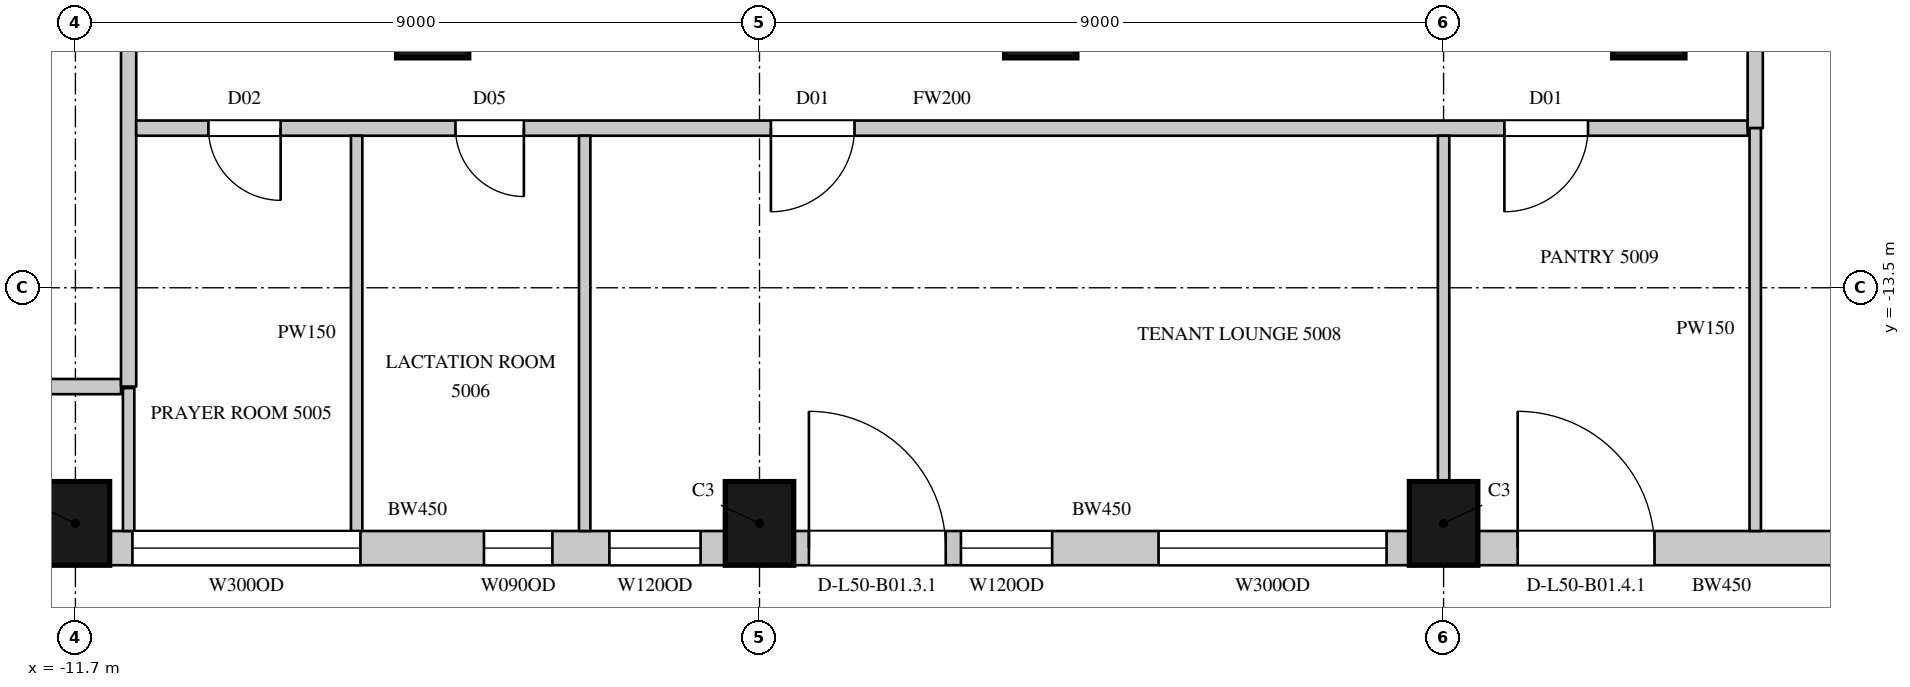
"""IFC4 building model, lengths in metres.
Left out: names, types, materials, properties, quantities, classifications, styles, units other than length and angle.
Written with IfcOpenShell. Run it as: python <this file> out.ifc"""

import sys

from ifc_helpers import new_model, si_unit, direction, frame, frame_2d, origin, origin_2d, place, context, subcontext, project, spatial, rectangle, circle, extrude, element, fill, save


model = new_model("IFC4")
c1 = context("Model", 3, precision=1e-05, world=origin(), true_north=direction((0.0, 1.0)))
c2 = subcontext(c1, "Body", "Model", "MODEL_VIEW")
j1 = project(units=[si_unit("LENGTHUNIT", "METRE"), si_unit("PLANEANGLEUNIT", "RADIAN")], contexts=[c1])
p1 = place(None, origin())
s1 = spatial("IfcSite", under=j1, at=p1, CompositionType="ELEMENT")
p2 = place(p1, origin())
s2 = spatial("IfcBuilding", under=s1, at=p2, CompositionType="ELEMENT")
p3 = place(p2, frame((0.0, 0.0, 226.1)))
s3 = spatial("IfcBuildingStorey", under=s2, at=p3, CompositionType="ELEMENT", Elevation=226.1)
for number, where, z_axis, x_axis in (
    (1, (-11.7, -16.6, 0.0), (0.0, 0.0, 1.0), (1.0, 0.0, 0.0)),
    (2, (-2.7, -16.6, 0.0), (0.0, 0.0, 1.0), (1.0, 0.0, 0.0)),
    (3, (6.3, -16.6, 0.0), (0.0, 0.0, 1.0), (1.0, 0.0, 0.0)),
):
    element("IfcColumn", number, at=place(p3, frame(where, z_axis=z_axis, x_axis=x_axis)), inside=s3, PredefinedType="COLUMN", context=c2, shape_type="SweptSolid", body=[
        extrude(rectangle(XDim=0.9, YDim=1.1, at=origin_2d()), origin(), (0.0, 0.0, 1.0), 4.1),
    ])
for number, where, z_axis, x_axis in (
    (4, (-7.0, -10.0, 0.0), (0.0, 0.0, 1.0), (1.0, 0.0, 0.0)),
    (5, (1.0, -10.0, 0.0), (0.0, 0.0, 1.0), (1.0, 0.0, 0.0)),
    (6, (9.0, -10.0, 0.0), (0.0, 0.0, 1.0), (1.0, 0.0, 0.0)),
):
    element("IfcColumn", number, at=place(p3, frame(where, z_axis=z_axis, x_axis=x_axis)), inside=s3, PredefinedType="COLUMN", context=c2, shape_type="SweptSolid", body=[
        extrude(circle(Radius=0.475, at=origin_2d()), origin(), (0.0, 0.0, 1.0), 4.1),
    ])
p4 = place(p3, frame((-11.25, -16.925, 0.0), z_axis=(0.0, 0.0, 1.0), x_axis=(1.0, 0.0, 0.0)))
e7 = element("IfcWall", 7, at=p4, inside=s3, PredefinedType="SOLIDWALL", context=c2, shape_type="SweptSolid", body=[
    extrude(rectangle(XDim=8.1, YDim=0.45, at=frame_2d((4.05, 0.0))), origin(), (0.0, 0.0, 1.0), 3.8),
])
p5 = place(p4, frame((0.3, 0.0, 1.05)))
e8 = element("IfcOpeningElement", 8, at=p5, cuts=e7, PredefinedType="OPENING", context=c2, shape_type="SweptSolid", body=[
    extrude(rectangle(XDim=3.0, YDim=2.4, at=frame_2d((1.5, 1.2))), frame((0.0, 0.235, 0.0), z_axis=(0.0, -1.0, 0.0), x_axis=(1.0, 0.0, 0.0)), (0.0, 0.0, 1.0), 0.47),
])
p6 = place(p4, frame((4.925, 0.0, 1.05)))
e9 = element("IfcOpeningElement", 9, at=p6, cuts=e7, PredefinedType="OPENING", context=c2, shape_type="SweptSolid", body=[
    extrude(rectangle(XDim=0.9, YDim=2.4, at=frame_2d((0.45, 1.2))), frame((0.0, 0.235, 0.0), z_axis=(0.0, -1.0, 0.0), x_axis=(1.0, 0.0, 0.0)), (0.0, 0.0, 1.0), 0.47),
])
p7 = place(p4, frame((6.575, 0.0, 1.05)))
e10 = element("IfcOpeningElement", 10, at=p7, cuts=e7, PredefinedType="OPENING", context=c2, shape_type="SweptSolid", body=[
    extrude(rectangle(XDim=1.2, YDim=2.4, at=frame_2d((0.6, 1.2))), frame((0.0, 0.235, 0.0), z_axis=(0.0, -1.0, 0.0), x_axis=(1.0, 0.0, 0.0)), (0.0, 0.0, 1.0), 0.47),
])
p8 = place(p3, frame((-2.25, -16.925, 0.0), z_axis=(0.0, 0.0, 1.0), x_axis=(1.0, 0.0, 0.0)))
e11 = element("IfcWall", 11, at=p8, inside=s3, PredefinedType="SOLIDWALL", context=c2, shape_type="SweptSolid", body=[
    extrude(rectangle(XDim=8.1, YDim=0.45, at=frame_2d((4.05, 0.0))), origin(), (0.0, 0.0, 1.0), 3.8),
])
p9 = place(p8, frame((0.2, 0.0, 0.0)))
e12 = element("IfcOpeningElement", 12, at=p9, cuts=e11, PredefinedType="OPENING", context=c2, shape_type="SweptSolid", body=[
    extrude(rectangle(XDim=1.8, YDim=2.4, at=frame_2d((0.9, 1.2))), frame((0.0, 0.235, 0.0), z_axis=(0.0, -1.0, 0.0), x_axis=(1.0, 0.0, 0.0)), (0.0, 0.0, 1.0), 0.47),
])
p10 = place(p8, frame((2.2, 0.0, 1.05)))
e13 = element("IfcOpeningElement", 13, at=p10, cuts=e11, PredefinedType="OPENING", context=c2, shape_type="SweptSolid", body=[
    extrude(rectangle(XDim=1.2, YDim=2.4, at=frame_2d((0.6, 1.2))), frame((0.0, 0.235, 0.0), z_axis=(0.0, -1.0, 0.0), x_axis=(1.0, 0.0, 0.0)), (0.0, 0.0, 1.0), 0.47),
])
p11 = place(p8, frame((4.8, 0.0, 1.05)))
e14 = element("IfcOpeningElement", 14, at=p11, cuts=e11, PredefinedType="OPENING", context=c2, shape_type="SweptSolid", body=[
    extrude(rectangle(XDim=3.0, YDim=2.4, at=frame_2d((1.5, 1.2))), frame((0.0, 0.235, 0.0), z_axis=(0.0, -1.0, 0.0), x_axis=(1.0, 0.0, 0.0)), (0.0, 0.0, 1.0), 0.47),
])
p12 = place(p3, frame((6.75, -16.925, 0.0), z_axis=(0.0, 0.0, 1.0), x_axis=(1.0, 0.0, 0.0)))
e15 = element("IfcWall", 15, at=p12, inside=s3, PredefinedType="SOLIDWALL", context=c2, shape_type="SweptSolid", body=[
    extrude(rectangle(XDim=6.414, YDim=0.45, at=frame_2d((3.207, 0.0))), origin(), (0.0, 0.0, 1.0), 3.8),
])
p13 = place(p12, frame((0.525, 0.0, 0.0)))
e16 = element("IfcOpeningElement", 16, at=p13, cuts=e15, PredefinedType="OPENING", context=c2, shape_type="SweptSolid", body=[
    extrude(rectangle(XDim=1.8, YDim=2.4, at=frame_2d((0.9, 1.2))), frame((0.0, 0.235, 0.0), z_axis=(0.0, -1.0, 0.0), x_axis=(1.0, 0.0, 0.0)), (0.0, 0.0, 1.0), 0.47),
])
p14 = place(p3, frame((-13.97, -14.8, 0.0), z_axis=(0.0, 0.0, 1.0), x_axis=(1.0, 0.0, 0.0)))
e17 = element("IfcWall", 17, at=p14, inside=s3, PredefinedType="PARTITIONING", context=c2, shape_type="SweptSolid", body=[
    extrude(rectangle(XDim=2.87, YDim=0.2, at=frame_2d((1.435, 0.0))), origin(), (0.0, 0.0, 1.0), 3.8),
])
p15 = place(p3, frame((-11.0, -14.8, 0.0), z_axis=(0.0, 0.0, 1.0), x_axis=(0.0, 1.0, 0.0)))
e18 = element("IfcWall", 18, at=p15, inside=s3, PredefinedType="PARTITIONING", context=c2, shape_type="SweptSolid", body=[
    extrude(rectangle(XDim=29.6, YDim=0.2, at=frame_2d((14.8, 0.0))), origin(), (0.0, 0.0, 1.0), 3.8),
])
p16 = place(p15, frame((14.45, 0.0, 0.0)))
e19 = element("IfcOpeningElement", 19, at=p16, cuts=e18, PredefinedType="OPENING", context=c2, shape_type="SweptSolid", body=[
    extrude(rectangle(XDim=1.5, YDim=2.4, at=frame_2d((0.75, 1.2))), frame((0.0, 0.11, 0.0), z_axis=(0.0, -1.0, 0.0), x_axis=(1.0, 0.0, 0.0)), (0.0, 0.0, 1.0), 0.22),
])
p17 = place(p3, frame((-10.9, -11.4, 0.0), z_axis=(0.0, 0.0, 1.0), x_axis=(1.0, 0.0, 0.0)))
e20 = element("IfcWall", 20, at=p17, inside=s3, PredefinedType="PARTITIONING", context=c2, shape_type="SweptSolid", body=[
    extrude(rectangle(XDim=21.2, YDim=0.2, at=frame_2d((10.6, 0.0))), origin(), (0.0, 0.0, 1.0), 3.8),
])
p18 = place(p17, frame((0.95, 0.0, 0.0)))
e21 = element("IfcOpeningElement", 21, at=p18, cuts=e20, PredefinedType="OPENING", context=c2, shape_type="SweptSolid", body=[
    extrude(rectangle(XDim=0.95, YDim=2.2, at=frame_2d((0.475, 1.1))), frame((0.0, 0.11, 0.0), z_axis=(0.0, -1.0, 0.0), x_axis=(1.0, 0.0, 0.0)), (0.0, 0.0, 1.0), 0.22),
])
p19 = place(p17, frame((4.2, 0.0, 0.0)))
e22 = element("IfcOpeningElement", 22, at=p19, cuts=e20, PredefinedType="OPENING", context=c2, shape_type="SweptSolid", body=[
    extrude(rectangle(XDim=0.9, YDim=2.2, at=frame_2d((0.45, 1.1))), frame((0.0, 0.11, 0.0), z_axis=(0.0, -1.0, 0.0), x_axis=(1.0, 0.0, 0.0)), (0.0, 0.0, 1.0), 0.22),
])
p20 = place(p17, frame((8.35, 0.0, 0.0)))
e23 = element("IfcOpeningElement", 23, at=p20, cuts=e20, PredefinedType="OPENING", context=c2, shape_type="SweptSolid", body=[
    extrude(rectangle(XDim=1.1, YDim=2.4, at=frame_2d((0.55, 1.2))), frame((0.0, 0.11, 0.0), z_axis=(0.0, -1.0, 0.0), x_axis=(1.0, 0.0, 0.0)), (0.0, 0.0, 1.0), 0.22),
])
p21 = place(p17, frame((18.0, 0.0, 0.0)))
e24 = element("IfcOpeningElement", 24, at=p21, cuts=e20, PredefinedType="OPENING", context=c2, shape_type="SweptSolid", body=[
    extrude(rectangle(XDim=1.1, YDim=2.4, at=frame_2d((0.55, 1.2))), frame((0.0, 0.11, 0.0), z_axis=(0.0, -1.0, 0.0), x_axis=(1.0, 0.0, 0.0)), (0.0, 0.0, 1.0), 0.22),
])
p22 = place(p3, frame((10.4, -11.4, 0.0), z_axis=(0.0, 0.0, 1.0), x_axis=(0.0, 1.0, 0.0)))
e25 = element("IfcWall", 25, at=p22, inside=s3, PredefinedType="PARTITIONING", context=c2, shape_type="SweptSolid", body=[
    extrude(rectangle(XDim=23.5, YDim=0.2, at=frame_2d((11.75, 0.0))), origin(), (0.0, 0.0, 1.0), 3.8),
])
p23 = place(p22, frame((9.25, 0.0, 0.0)))
e26 = element("IfcOpeningElement", 26, at=p23, cuts=e25, PredefinedType="OPENING", context=c2, shape_type="SweptSolid", body=[
    extrude(rectangle(XDim=1.5, YDim=2.4, at=frame_2d((0.75, 1.2))), frame((0.0, 0.11, 0.0), z_axis=(0.0, -1.0, 0.0), x_axis=(1.0, 0.0, 0.0)), (0.0, 0.0, 1.0), 0.22),
])
p24 = place(p22, frame((2.85, 0.0, 0.0)))
e27 = element("IfcOpeningElement", 27, at=p24, cuts=e25, PredefinedType="OPENING", context=c2, shape_type="SweptSolid", body=[
    extrude(rectangle(XDim=1.1, YDim=2.4, at=frame_2d((0.55, 1.2))), frame((0.0, 0.11, 0.0), z_axis=(0.0, -1.0, 0.0), x_axis=(1.0, 0.0, 0.0)), (0.0, 0.0, 1.0), 0.22),
])
p25 = place(p3, frame((-11.0, -16.7, 0.0), z_axis=(0.0, 0.0, 1.0), x_axis=(0.0, 1.0, 0.0)))
e28 = element("IfcWall", 28, at=p25, inside=s3, PredefinedType="PARTITIONING", context=c2, shape_type="SweptSolid", body=[
    extrude(rectangle(XDim=1.88, YDim=0.15, at=frame_2d((0.94, 0.0))), origin(), (0.0, 0.0, 1.0), 3.8),
])
for number, where, z_axis, x_axis in (
    (29, (-8.0, -16.7, 0.0), (0.0, 0.0, 1.0), (0.0, 1.0, 0.0)),
    (30, (-5.0, -16.7, 0.0), (0.0, 0.0, 1.0), (0.0, 1.0, 0.0)),
):
    element("IfcWall", number, at=place(p3, frame(where, z_axis=z_axis, x_axis=x_axis)), inside=s3, PredefinedType="PARTITIONING", context=c2, shape_type="SweptSolid", body=[
        extrude(rectangle(XDim=5.2, YDim=0.15, at=frame_2d((2.6, 0.0))), origin(), (0.0, 0.0, 1.0), 3.8),
    ])
p26 = place(p3, frame((6.3, -16.05, 0.0), z_axis=(0.0, 0.0, 1.0), x_axis=(0.0, 1.0, 0.0)))
e31 = element("IfcWall", 31, at=p26, inside=s3, PredefinedType="PARTITIONING", context=c2, shape_type="SweptSolid", body=[
    extrude(rectangle(XDim=4.55, YDim=0.15, at=frame_2d((2.275, 0.0))), origin(), (0.0, 0.0, 1.0), 3.25),
])
p27 = place(p3, frame((10.4, -16.7, 0.0), z_axis=(0.0, 0.0, 1.0), x_axis=(0.0, 1.0, 0.0)))
e32 = element("IfcWall", 32, at=p27, inside=s3, PredefinedType="PARTITIONING", context=c2, shape_type="SweptSolid", body=[
    extrude(rectangle(XDim=5.3, YDim=0.15, at=frame_2d((2.65, 0.0))), origin(), (0.0, 0.0, 1.0), 3.8),
])
p28 = place(p5, origin())
e33 = element("IfcWindow", 33, at=p28, inside=s3, PartitioningType="SINGLE_PANEL", PredefinedType="WINDOW", context=c2, shape_type="SweptSolid", body=[
    extrude(rectangle(XDim=3.0, YDim=2.4, at=frame_2d((1.5, 1.2))), frame((0.0, 0.135, 0.0), z_axis=(0.0, -1.0, 0.0), x_axis=(1.0, 0.0, 0.0)), (0.0, 0.0, 1.0), 0.06),
])
fill(e8, e33)
p29 = place(p9, origin())
e34 = element("IfcDoor", 34, at=p29, inside=s3, OperationType="SLIDING_TO_LEFT", PredefinedType="DOOR", context=c2, shape_type="SweptSolid", body=[
    extrude(rectangle(XDim=1.8, YDim=2.4, at=frame_2d((0.9, 1.2))), frame((0.0, 0.13, 0.0), z_axis=(0.0, -1.0, 0.0), x_axis=(1.0, 0.0, 0.0)), (0.0, 0.0, 1.0), 0.05),
])
fill(e12, e34)
p30 = place(p10, origin())
e35 = element("IfcWindow", 35, at=p30, inside=s3, PartitioningType="SINGLE_PANEL", PredefinedType="WINDOW", context=c2, shape_type="SweptSolid", body=[
    extrude(rectangle(XDim=1.2, YDim=2.4, at=frame_2d((0.6, 1.2))), frame((0.0, 0.135, 0.0), z_axis=(0.0, -1.0, 0.0), x_axis=(1.0, 0.0, 0.0)), (0.0, 0.0, 1.0), 0.06),
])
fill(e13, e35)
p31 = place(p11, origin())
e36 = element("IfcWindow", 36, at=p31, inside=s3, PartitioningType="SINGLE_PANEL", PredefinedType="WINDOW", context=c2, shape_type="SweptSolid", body=[
    extrude(rectangle(XDim=3.0, YDim=2.4, at=frame_2d((1.5, 1.2))), frame((0.0, 0.135, 0.0), z_axis=(0.0, -1.0, 0.0), x_axis=(1.0, 0.0, 0.0)), (0.0, 0.0, 1.0), 0.06),
])
fill(e14, e36)
p32 = place(p13, origin())
e37 = element("IfcDoor", 37, at=p32, inside=s3, OperationType="SLIDING_TO_LEFT", PredefinedType="DOOR", context=c2, shape_type="SweptSolid", body=[
    extrude(rectangle(XDim=1.8, YDim=2.4, at=frame_2d((0.9, 1.2))), frame((0.0, 0.13, 0.0), z_axis=(0.0, -1.0, 0.0), x_axis=(1.0, 0.0, 0.0)), (0.0, 0.0, 1.0), 0.05),
])
fill(e16, e37)
p33 = place(p18, origin())
e38 = element("IfcDoor", 38, at=p33, inside=s3, OperationType="SINGLE_SWING_LEFT", PredefinedType="DOOR", context=c2, shape_type="SweptSolid", body=[
    extrude(rectangle(XDim=0.95, YDim=2.2, at=frame_2d((0.475, 1.1))), frame((0.0, 0.025, 0.0), z_axis=(0.0, -1.0, 0.0), x_axis=(1.0, 0.0, 0.0)), (0.0, 0.0, 1.0), 0.05),
])
fill(e21, e38)
p34 = place(p19, origin())
e39 = element("IfcDoor", 39, at=p34, inside=s3, OperationType="SINGLE_SWING_LEFT", PredefinedType="DOOR", context=c2, shape_type="SweptSolid", body=[
    extrude(rectangle(XDim=0.9, YDim=2.2, at=frame_2d((0.45, 1.1))), frame((0.0, 0.025, 0.0), z_axis=(0.0, -1.0, 0.0), x_axis=(1.0, 0.0, 0.0)), (0.0, 0.0, 1.0), 0.05),
])
fill(e22, e39)
p35 = place(p20, origin())
e40 = element("IfcDoor", 40, at=p35, inside=s3, OperationType="SINGLE_SWING_RIGHT", PredefinedType="DOOR", context=c2, shape_type="SweptSolid", body=[
    extrude(rectangle(XDim=1.1, YDim=2.4, at=frame_2d((0.55, 1.2))), frame((0.0, 0.025, 0.0), z_axis=(0.0, -1.0, 0.0), x_axis=(1.0, 0.0, 0.0)), (0.0, 0.0, 1.0), 0.05),
])
fill(e23, e40)
p36 = place(p21, origin())
e41 = element("IfcDoor", 41, at=p36, inside=s3, OperationType="SINGLE_SWING_RIGHT", PredefinedType="DOOR", context=c2, shape_type="SweptSolid", body=[
    extrude(rectangle(XDim=1.1, YDim=2.4, at=frame_2d((0.55, 1.2))), frame((0.0, 0.025, 0.0), z_axis=(0.0, -1.0, 0.0), x_axis=(1.0, 0.0, 0.0)), (0.0, 0.0, 1.0), 0.05),
])
fill(e24, e41)
p37 = place(p6, origin())
e42 = element("IfcWindow", 42, at=p37, inside=s3, PartitioningType="SINGLE_PANEL", PredefinedType="WINDOW", context=c2, shape_type="SweptSolid", body=[
    extrude(rectangle(XDim=0.9, YDim=2.4, at=frame_2d((0.45, 1.2))), frame((0.0, 0.135, 0.0), z_axis=(0.0, -1.0, 0.0), x_axis=(1.0, 0.0, 0.0)), (0.0, 0.0, 1.0), 0.06),
])
fill(e9, e42)
p38 = place(p7, origin())
e43 = element("IfcWindow", 43, at=p38, inside=s3, PartitioningType="SINGLE_PANEL", PredefinedType="WINDOW", context=c2, shape_type="SweptSolid", body=[
    extrude(rectangle(XDim=1.2, YDim=2.4, at=frame_2d((0.6, 1.2))), frame((0.0, 0.135, 0.0), z_axis=(0.0, -1.0, 0.0), x_axis=(1.0, 0.0, 0.0)), (0.0, 0.0, 1.0), 0.06),
])
fill(e10, e43)
save(model, sys.argv[1])
